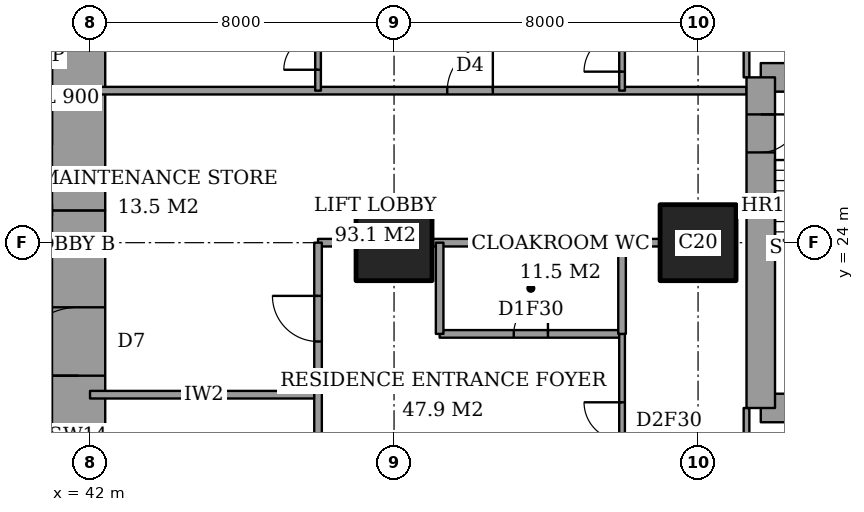
"""IFC4 building model, lengths in metres.
Left out: names, types, materials, properties, quantities, classifications, styles, units other than length and angle.
Written with IfcOpenShell. Run it as: python <this file> out.ifc"""

import sys

from ifc_helpers import new_model, si_unit, direction, frame, frame_2d, origin, origin_2d, place, context, subcontext, project, spatial, rectangle, extrude, element, fill, save


model = new_model("IFC4")
c1 = context("Model", 3, precision=1e-05, world=origin(), true_north=direction((0.0, 1.0)))
c2 = subcontext(c1, "Body", "Model", "MODEL_VIEW")
j1 = project(units=[si_unit("LENGTHUNIT", "METRE"), si_unit("PLANEANGLEUNIT", "RADIAN")], contexts=[c1])
p1 = place(None, origin())
s1 = spatial("IfcSite", under=j1, at=p1, CompositionType="ELEMENT")
p2 = place(p1, origin())
s2 = spatial("IfcBuilding", under=s1, at=p2, CompositionType="ELEMENT")
p3 = place(p2, frame((0.0, 0.0, 87.2)))
s3 = spatial("IfcBuildingStorey", under=s2, at=p3, CompositionType="ELEMENT", Elevation=87.2)
for number, where, z_axis, x_axis in (
    (1, (50.0, 24.0, 0.0), (0.0, 0.0, 1.0), (1.0, 0.0, 0.0)),
    (2, (58.0, 24.0, 0.0), (0.0, 0.0, 1.0), (1.0, 0.0, 0.0)),
):
    element("IfcColumn", number, at=place(p3, frame(where, z_axis=z_axis, x_axis=x_axis)), inside=s3, PredefinedType="COLUMN", context=c2, shape_type="SweptSolid", body=[
        extrude(rectangle(XDim=2.0, YDim=2.0, at=origin_2d()), origin(), (0.0, 0.0, 1.0), 3.6),
    ])
p4 = place(p3, frame((41.7, 13.0, 0.0), z_axis=(0.0, 0.0, 1.0), x_axis=(0.0, 1.0, 0.0)))
e3 = element("IfcWall", 3, at=p4, inside=s3, PredefinedType="SHEAR", context=c2, shape_type="SweptSolid", body=[
    extrude(rectangle(XDim=11.85, YDim=1.4, at=frame_2d((5.925, 0.0))), origin(), (0.0, 0.0, 1.0), 3.6),
])
p5 = place(p4, frame((7.5, 0.0, 0.0)))
e4 = element("IfcOpeningElement", 4, at=p5, cuts=e3, PredefinedType="OPENING", context=c2, shape_type="SweptSolid", body=[
    extrude(rectangle(XDim=1.8, YDim=2.4, at=frame_2d((0.9, 1.2))), frame((0.0, 0.71, 0.0), z_axis=(0.0, -1.0, 0.0), x_axis=(1.0, 0.0, 0.0)), (0.0, 0.0, 1.0), 1.42),
])
p6 = place(p3, frame((41.7, 24.85, 0.0), z_axis=(0.0, 0.0, 1.0), x_axis=(0.0, 1.0, 0.0)))
e5 = element("IfcWall", 5, at=p6, inside=s3, PredefinedType="SHEAR", context=c2, shape_type="SweptSolid", body=[
    extrude(rectangle(XDim=10.15, YDim=1.4, at=frame_2d((5.075, 0.0))), origin(), (0.0, 0.0, 1.0), 3.6),
])
for number, where, z_axis, x_axis in (
    (6, (59.65, 19.65, 0.0), (0.0, 0.0, 1.0), (1.0, 0.0, 0.0)),
    (7, (64.1, 28.35, 0.0), (0.0, 0.0, 1.0), (-1.0, 0.0, 0.0)),
):
    element("IfcWall", number, at=place(p3, frame(where, z_axis=z_axis, x_axis=x_axis)), inside=s3, PredefinedType="SHEAR", context=c2, shape_type="SweptSolid", body=[
        extrude(rectangle(XDim=4.45, YDim=0.75, at=frame_2d((2.225, 0.0))), origin(), (0.0, 0.0, 1.0), 3.6),
    ])
p7 = place(p3, frame((59.65, 28.35, 0.0), z_axis=(0.0, 0.0, 1.0), x_axis=(0.0, -1.0, 0.0)))
e8 = element("IfcWall", 8, at=p7, inside=s3, PredefinedType="SHEAR", context=c2, shape_type="SweptSolid", body=[
    extrude(rectangle(XDim=8.7, YDim=0.75, at=frame_2d((4.35, 0.0))), origin(), (0.0, 0.0, 1.0), 3.6),
])
p8 = place(p7, frame((0.975, 0.0, 0.0)))
e9 = element("IfcOpeningElement", 9, at=p8, cuts=e8, PredefinedType="OPENING", context=c2, shape_type="SweptSolid", body=[
    extrude(rectangle(XDim=1.0, YDim=2.1, at=frame_2d((0.5, 1.05))), frame((0.0, 0.385, 0.0), z_axis=(0.0, -1.0, 0.0), x_axis=(1.0, 0.0, 0.0)), (0.0, 0.0, 1.0), 0.77),
])
p9 = place(p3, frame((42.0, 20.0, 0.0), z_axis=(0.0, 0.0, 1.0), x_axis=(1.0, 0.0, 0.0)))
e10 = element("IfcWall", 10, at=p9, inside=s3, PredefinedType="PARTITIONING", context=c2, shape_type="SweptSolid", body=[
    extrude(rectangle(XDim=6.0, YDim=0.2, at=frame_2d((3.0, 0.0))), origin(), (0.0, 0.0, 1.0), 3.25),
])
p10 = place(p3, frame((51.2, 21.6, 0.0), z_axis=(0.0, 0.0, 1.0), x_axis=(1.0, 0.0, 0.0)))
e11 = element("IfcWall", 11, at=p10, inside=s3, PredefinedType="PARTITIONING", context=c2, shape_type="SweptSolid", body=[
    extrude(rectangle(XDim=4.8, YDim=0.2, at=frame_2d((2.4, 0.0))), origin(), (0.0, 0.0, 1.0), 3.25),
])
p11 = place(p10, frame((1.95, 0.0, 0.0)))
e12 = element("IfcOpeningElement", 12, at=p11, cuts=e11, PredefinedType="OPENING", context=c2, shape_type="SweptSolid", body=[
    extrude(rectangle(XDim=0.9, YDim=2.1, at=frame_2d((0.45, 1.05))), frame((0.0, 0.11, 0.0), z_axis=(0.0, -1.0, 0.0), x_axis=(1.0, 0.0, 0.0)), (0.0, 0.0, 1.0), 0.22),
])
p12 = place(p3, frame((48.0, 24.0, 0.0), z_axis=(0.0, 0.0, 1.0), x_axis=(1.0, 0.0, 0.0)))
e13 = element("IfcWall", 13, at=p12, inside=s3, PredefinedType="PARTITIONING", context=c2, shape_type="SweptSolid", body=[
    extrude(rectangle(XDim=1.0, YDim=0.2, at=frame_2d((0.5, 0.0))), origin(), (0.0, 0.0, 1.0), 3.25),
])
p13 = place(p3, frame((51.0, 24.0, 0.0), z_axis=(0.0, 0.0, 1.0), x_axis=(1.0, 0.0, 0.0)))
e14 = element("IfcWall", 14, at=p13, inside=s3, PredefinedType="PARTITIONING", context=c2, shape_type="SweptSolid", body=[
    extrude(rectangle(XDim=6.0, YDim=0.2, at=frame_2d((3.0, 0.0))), origin(), (0.0, 0.0, 1.0), 3.25),
])
p14 = place(p3, frame((42.0, 28.0, 0.0), z_axis=(0.0, 0.0, 1.0), x_axis=(1.0, 0.0, 0.0)))
e15 = element("IfcWall", 15, at=p14, inside=s3, PredefinedType="PARTITIONING", context=c2, shape_type="SweptSolid", body=[
    extrude(rectangle(XDim=17.275, YDim=0.2, at=frame_2d((8.637, 0.0))), origin(), (0.0, 0.0, 1.0), 3.25),
])
p15 = place(p14, frame((9.4, 0.0, 0.0)))
e16 = element("IfcOpeningElement", 16, at=p15, cuts=e15, PredefinedType="OPENING", context=c2, shape_type="SweptSolid", body=[
    extrude(rectangle(XDim=1.2, YDim=2.4, at=frame_2d((0.6, 1.2))), frame((0.0, 0.11, 0.0), z_axis=(0.0, -1.0, 0.0), x_axis=(1.0, 0.0, 0.0)), (0.0, 0.0, 1.0), 0.22),
])
p16 = place(p3, frame((48.0, 17.0, 0.0), z_axis=(0.0, 0.0, 1.0), x_axis=(0.0, 1.0, 0.0)))
e17 = element("IfcWall", 17, at=p16, inside=s3, PredefinedType="PARTITIONING", context=c2, shape_type="SweptSolid", body=[
    extrude(rectangle(XDim=7.0, YDim=0.2, at=frame_2d((3.5, 0.0))), origin(), (0.0, 0.0, 1.0), 3.25),
])
p17 = place(p16, frame((4.4, 0.0, 0.0)))
e18 = element("IfcOpeningElement", 18, at=p17, cuts=e17, PredefinedType="OPENING", context=c2, shape_type="SweptSolid", body=[
    extrude(rectangle(XDim=1.2, YDim=2.4, at=frame_2d((0.6, 1.2))), frame((0.0, 0.11, 0.0), z_axis=(0.0, -1.0, 0.0), x_axis=(1.0, 0.0, 0.0)), (0.0, 0.0, 1.0), 0.22),
])
p18 = place(p16, frame((1.05, 0.0, 0.0)))
e19 = element("IfcOpeningElement", 19, at=p18, cuts=e17, PredefinedType="OPENING", context=c2, shape_type="SweptSolid", body=[
    extrude(rectangle(XDim=0.9, YDim=2.1, at=frame_2d((0.45, 1.05))), frame((0.0, 0.11, 0.0), z_axis=(0.0, -1.0, 0.0), x_axis=(1.0, 0.0, 0.0)), (0.0, 0.0, 1.0), 0.22),
])
p19 = place(p3, frame((48.0, 28.0, 0.0), z_axis=(0.0, 0.0, 1.0), x_axis=(0.0, 1.0, 0.0)))
e20 = element("IfcWall", 20, at=p19, inside=s3, PredefinedType="PARTITIONING", context=c2, shape_type="SweptSolid", body=[
    extrude(rectangle(XDim=9.4, YDim=0.15, at=frame_2d((4.7, 0.0))), origin(), (0.0, 0.0, 1.0), 3.25),
])
p20 = place(p19, frame((0.55, 0.0, 0.0)))
e21 = element("IfcOpeningElement", 21, at=p20, cuts=e20, PredefinedType="OPENING", context=c2, shape_type="SweptSolid", body=[
    extrude(rectangle(XDim=0.9, YDim=2.1, at=frame_2d((0.45, 1.05))), frame((0.0, 0.085, 0.0), z_axis=(0.0, -1.0, 0.0), x_axis=(1.0, 0.0, 0.0)), (0.0, 0.0, 1.0), 0.17),
])
for number, where, z_axis, x_axis in (
    (22, (51.2, 21.6, 0.0), (0.0, 0.0, 1.0), (0.0, 1.0, 0.0)),
    (23, (56.0, 21.6, 0.0), (0.0, 0.0, 1.0), (0.0, 1.0, 0.0)),
):
    element("IfcWall", number, at=place(p3, frame(where, z_axis=z_axis, x_axis=x_axis)), inside=s3, PredefinedType="PARTITIONING", context=c2, shape_type="SweptSolid", body=[
        extrude(rectangle(XDim=2.4, YDim=0.2, at=frame_2d((1.2, 0.0))), origin(), (0.0, 0.0, 1.0), 3.25),
    ])
p21 = place(p3, frame((56.0, 10.6, 0.0), z_axis=(0.0, 0.0, 1.0), x_axis=(0.0, 1.0, 0.0)))
e24 = element("IfcWall", 24, at=p21, inside=s3, PredefinedType="PARTITIONING", context=c2, shape_type="SweptSolid", body=[
    extrude(rectangle(XDim=11.0, YDim=0.15, at=frame_2d((5.5, 0.0))), origin(), (0.0, 0.0, 1.0), 3.25),
])
p22 = place(p21, frame((8.2, 0.0, 0.0)))
e25 = element("IfcOpeningElement", 25, at=p22, cuts=e24, PredefinedType="OPENING", context=c2, shape_type="SweptSolid", body=[
    extrude(rectangle(XDim=1.0, YDim=2.1, at=frame_2d((0.5, 1.05))), frame((0.0, 0.085, 0.0), z_axis=(0.0, -1.0, 0.0), x_axis=(1.0, 0.0, 0.0)), (0.0, 0.0, 1.0), 0.17),
])
p23 = place(p3, frame((56.0, 28.0, 0.0), z_axis=(0.0, 0.0, 1.0), x_axis=(0.0, 1.0, 0.0)))
e26 = element("IfcWall", 26, at=p23, inside=s3, PredefinedType="PARTITIONING", context=c2, shape_type="SweptSolid", body=[
    extrude(rectangle(XDim=9.4, YDim=0.15, at=frame_2d((4.7, 0.0))), origin(), (0.0, 0.0, 1.0), 3.25),
])
p24 = place(p23, frame((0.5, 0.0, 0.0)))
e27 = element("IfcOpeningElement", 27, at=p24, cuts=e26, PredefinedType="OPENING", context=c2, shape_type="SweptSolid", body=[
    extrude(rectangle(XDim=1.0, YDim=2.1, at=frame_2d((0.5, 1.05))), frame((0.0, 0.085, 0.0), z_axis=(0.0, -1.0, 0.0), x_axis=(1.0, 0.0, 0.0)), (0.0, 0.0, 1.0), 0.17),
])
p25 = place(p3, frame((59.275, 17.2, 0.0), z_axis=(0.0, 0.0, 1.0), x_axis=(0.0, 1.0, 0.0)))
e28 = element("IfcWall", 28, at=p25, inside=s3, PredefinedType="PARTITIONING", context=c2, shape_type="SweptSolid", body=[
    extrude(rectangle(XDim=2.45, YDim=0.15, at=frame_2d((1.225, 0.0))), origin(), (0.0, 0.0, 1.0), 3.25),
])
p26 = place(p25, frame((0.538, 0.0, 0.0)))
e29 = element("IfcOpeningElement", 29, at=p26, cuts=e28, PredefinedType="OPENING", context=c2, shape_type="SweptSolid", body=[
    extrude(rectangle(XDim=1.0, YDim=2.1, at=frame_2d((0.5, 1.05))), frame((0.0, 0.085, 0.0), z_axis=(0.0, -1.0, 0.0), x_axis=(1.0, 0.0, 0.0)), (0.0, 0.0, 1.0), 0.17),
])
p27 = place(p3, frame((59.275, 28.35, 0.0), z_axis=(0.0, 0.0, 1.0), x_axis=(0.0, 1.0, 0.0)))
e30 = element("IfcWall", 30, at=p27, inside=s3, PredefinedType="PARTITIONING", context=c2, shape_type="SweptSolid", body=[
    extrude(rectangle(XDim=2.45, YDim=0.15, at=frame_2d((1.225, 0.0))), origin(), (0.0, 0.0, 1.0), 3.25),
])
p28 = place(p27, frame((0.913, 0.0, 0.0)))
e31 = element("IfcOpeningElement", 31, at=p28, cuts=e30, PredefinedType="OPENING", context=c2, shape_type="SweptSolid", body=[
    extrude(rectangle(XDim=1.0, YDim=2.1, at=frame_2d((0.5, 1.05))), frame((0.0, 0.085, 0.0), z_axis=(0.0, -1.0, 0.0), x_axis=(1.0, 0.0, 0.0)), (0.0, 0.0, 1.0), 0.17),
])
p29 = place(p22, origin())
e32 = element("IfcDoor", 32, at=p29, inside=s3, OperationType="SINGLE_SWING_LEFT", PredefinedType="DOOR", context=c2, shape_type="SweptSolid", body=[
    extrude(rectangle(XDim=1.0, YDim=2.1, at=frame_2d((0.5, 1.05))), frame((0.0, 0.025, 0.0), z_axis=(0.0, -1.0, 0.0), x_axis=(1.0, 0.0, 0.0)), (0.0, 0.0, 1.0), 0.05),
])
fill(e25, e32)
p30 = place(p11, origin())
e33 = element("IfcDoor", 33, at=p30, inside=s3, OperationType="SINGLE_SWING_LEFT", PredefinedType="DOOR", context=c2, shape_type="SweptSolid", body=[
    extrude(rectangle(XDim=0.9, YDim=2.1, at=frame_2d((0.45, 1.05))), frame((0.0, 0.025, 0.0), z_axis=(0.0, -1.0, 0.0), x_axis=(1.0, 0.0, 0.0)), (0.0, 0.0, 1.0), 0.05),
])
fill(e12, e33)
p31 = place(p17, origin())
e34 = element("IfcDoor", 34, at=p31, inside=s3, OperationType="SINGLE_SWING_LEFT", PredefinedType="DOOR", context=c2, shape_type="SweptSolid", body=[
    extrude(rectangle(XDim=1.2, YDim=2.4, at=frame_2d((0.6, 1.2))), frame((0.0, 0.025, 0.0), z_axis=(0.0, -1.0, 0.0), x_axis=(1.0, 0.0, 0.0)), (0.0, 0.0, 1.0), 0.05),
])
fill(e18, e34)
p32 = place(p24, origin())
e35 = element("IfcDoor", 35, at=p32, inside=s3, OperationType="SINGLE_SWING_RIGHT", PredefinedType="DOOR", context=c2, shape_type="SweptSolid", body=[
    extrude(rectangle(XDim=1.0, YDim=2.1, at=frame_2d((0.5, 1.05))), frame((0.0, 0.025, 0.0), z_axis=(0.0, -1.0, 0.0), x_axis=(1.0, 0.0, 0.0)), (0.0, 0.0, 1.0), 0.05),
])
fill(e27, e35)
p33 = place(p15, origin())
e36 = element("IfcDoor", 36, at=p33, inside=s3, OperationType="SINGLE_SWING_LEFT", PredefinedType="DOOR", context=c2, shape_type="SweptSolid", body=[
    extrude(rectangle(XDim=1.2, YDim=2.4, at=frame_2d((0.6, 1.2))), frame((0.0, 0.025, 0.0), z_axis=(0.0, -1.0, 0.0), x_axis=(1.0, 0.0, 0.0)), (0.0, 0.0, 1.0), 0.05),
])
fill(e16, e36)
p34 = place(p20, origin())
e37 = element("IfcDoor", 37, at=p34, inside=s3, OperationType="SINGLE_SWING_RIGHT", PredefinedType="DOOR", context=c2, shape_type="SweptSolid", body=[
    extrude(rectangle(XDim=0.9, YDim=2.1, at=frame_2d((0.45, 1.05))), frame((0.0, 0.025, 0.0), z_axis=(0.0, -1.0, 0.0), x_axis=(1.0, 0.0, 0.0)), (0.0, 0.0, 1.0), 0.05),
])
fill(e21, e37)
p35 = place(p5, origin())
e38 = element("IfcDoor", 38, at=p35, inside=s3, OperationType="DOUBLE_DOOR_DOUBLE_SWING", PredefinedType="DOOR", context=c2, shape_type="SweptSolid", body=[
    extrude(rectangle(XDim=1.8, YDim=2.4, at=frame_2d((0.9, 1.2))), frame((0.0, 0.025, 0.0), z_axis=(0.0, -1.0, 0.0), x_axis=(1.0, 0.0, 0.0)), (0.0, 0.0, 1.0), 0.05),
])
fill(e4, e38)
p36 = place(p8, origin())
e39 = element("IfcDoor", 39, at=p36, inside=s3, OperationType="SINGLE_SWING_RIGHT", PredefinedType="DOOR", context=c2, shape_type="SweptSolid", body=[
    extrude(rectangle(XDim=1.0, YDim=2.1, at=frame_2d((0.5, 1.05))), frame((0.0, 0.025, 0.0), z_axis=(0.0, -1.0, 0.0), x_axis=(1.0, 0.0, 0.0)), (0.0, 0.0, 1.0), 0.05),
])
fill(e9, e39)
save(model, sys.argv[1])
